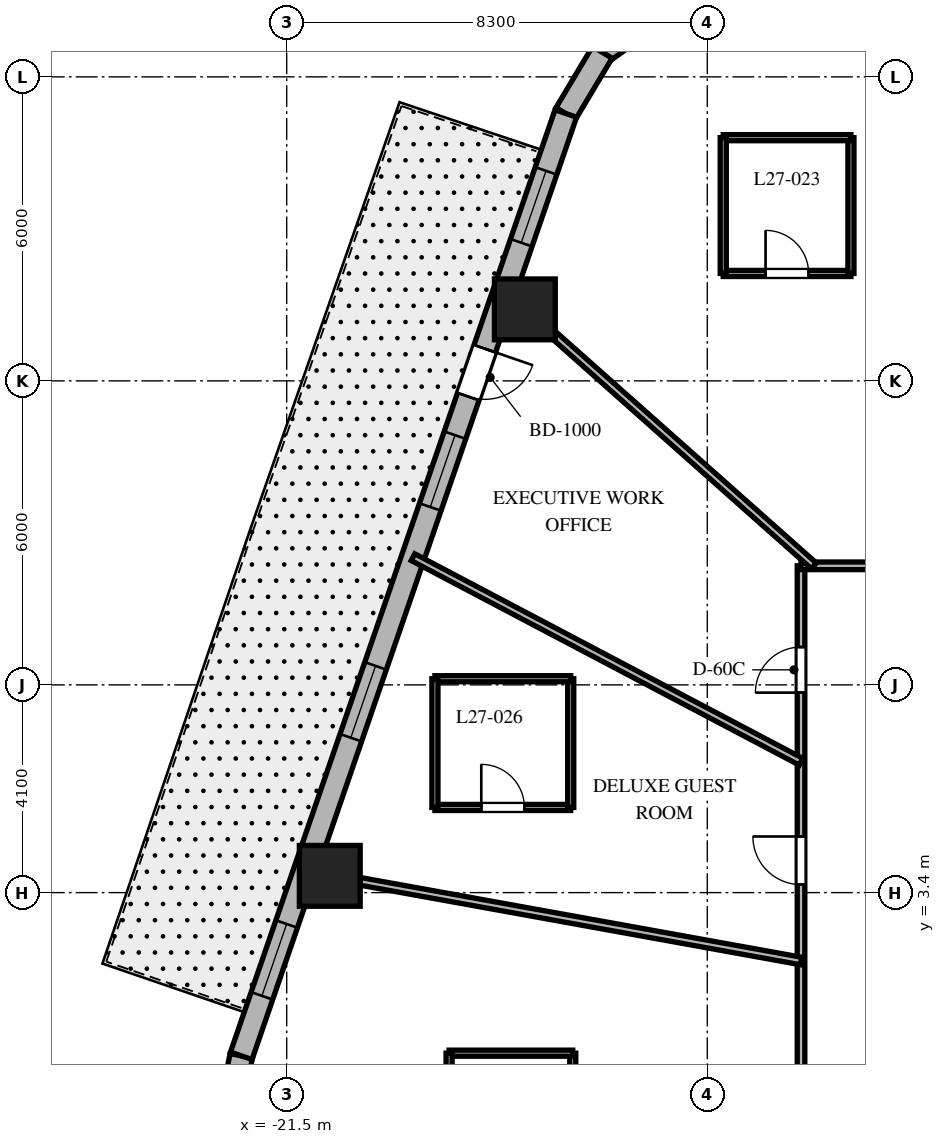
"""IFC4 building model, lengths in metres.
Left out: names, types, materials, properties, quantities, classifications, styles, units other than length and angle.
Written with IfcOpenShell. Run it as: python <this file> out.ifc"""

import sys

from ifc_helpers import new_model, si_unit, direction, frame, frame_2d, origin, origin_2d, place, context, subcontext, project, spatial, rectangle, extrude, element, fill, save


model = new_model("IFC4")
c1 = context("Model", 3, precision=1e-05, world=origin(), true_north=direction((0.0, 1.0)))
c2 = subcontext(c1, "Body", "Model", "MODEL_VIEW")
j1 = project(units=[si_unit("LENGTHUNIT", "METRE"), si_unit("PLANEANGLEUNIT", "RADIAN")], contexts=[c1])
p1 = place(None, origin())
s1 = spatial("IfcSite", under=j1, at=p1, CompositionType="ELEMENT")
p2 = place(p1, origin())
s2 = spatial("IfcBuilding", under=s1, at=p2, CompositionType="ELEMENT")
p3 = place(p2, frame((0.0, 0.0, 113.6)))
s3 = spatial("IfcBuildingStorey", under=s2, at=p3, CompositionType="ELEMENT", Elevation=113.6)
for number, where, z_axis, x_axis in (
    (1, (-16.8, 14.911, 0.0), (0.0, 0.0, 1.0), (1.0, 0.0, 0.0)),
    (2, (-20.65, 3.731, 0.0), (0.0, 0.0, 1.0), (1.0, 0.0, 0.0)),
):
    element("IfcColumn", number, at=place(p3, frame(where, z_axis=z_axis, x_axis=x_axis)), inside=s3, PredefinedType="COLUMN", context=c2, shape_type="SweptSolid", body=[
        extrude(rectangle(XDim=1.2, YDim=1.2, at=origin_2d()), origin(), (0.0, 0.0, 1.0), 3.7),
    ])
p4 = place(p3, frame((-14.146, 20.787, 0.0), z_axis=(0.0, 0.0, 1.0), x_axis=(-0.814162929117, -0.580636482536, 0.0)))
e3 = element("IfcWall", 3, at=p4, inside=s3, PredefinedType="SOLIDWALL", context=c2, shape_type="SweptSolid", body=[
    extrude(rectangle(XDim=1.382, YDim=0.45, at=frame_2d((0.691, 0.0))), origin(), (0.0, 0.0, 1.0), 3.4),
])
p5 = place(p3, frame((-15.272, 19.984, 0.0), z_axis=(0.0, 0.0, 1.0), x_axis=(-0.512579347361, -0.858639862025, 0.0)))
e4 = element("IfcWall", 4, at=p5, inside=s3, PredefinedType="SOLIDWALL", context=c2, shape_type="SweptSolid", body=[
    extrude(rectangle(XDim=1.406, YDim=0.45, at=frame_2d((0.703, 0.0))), origin(), (0.0, 0.0, 1.0), 3.4),
])
p6 = place(p3, frame((-22.397, 0.179, 0.0), z_axis=(0.0, 0.0, 1.0), x_axis=(-0.199313589404, -0.979935759669, 0.0)))
e5 = element("IfcWall", 5, at=p6, inside=s3, PredefinedType="SOLIDWALL", context=c2, shape_type="SweptSolid", body=[
    extrude(rectangle(XDim=0.896, YDim=0.45, at=frame_2d((0.448, 0.0))), origin(), (0.0, 0.0, 1.0), 3.4),
])
p7 = place(p3, frame((-15.992, 18.777, 0.0), z_axis=(0.0, 0.0, 1.0), x_axis=(-0.325606988926, -0.945505202927, 0.0)))
e6 = element("IfcWall", 6, at=p7, inside=s3, PredefinedType="SOLIDWALL", context=c2, shape_type="SweptSolid", body=[
    extrude(rectangle(XDim=19.669, YDim=0.45, at=frame_2d((9.835, 0.0))), origin(), (0.0, 0.0, 1.0), 3.4),
])
p8 = place(p7, frame((4.909, 0.0, 0.0)))
e7 = element("IfcOpeningElement", 7, at=p8, cuts=e6, PredefinedType="OPENING", context=c2, shape_type="SweptSolid", body=[
    extrude(rectangle(XDim=1.0, YDim=2.15, at=frame_2d((0.5, 1.075))), frame((0.0, 0.235, 0.0), z_axis=(0.0, -1.0, 0.0), x_axis=(1.0, 0.0, 0.0)), (0.0, 0.0, 1.0), 0.47),
])
p9 = place(p7, frame((1.197, 0.0, 0.8)))
e8 = element("IfcOpeningElement", 8, at=p9, cuts=e6, PredefinedType="OPENING", context=c2, shape_type="SweptSolid", body=[
    extrude(rectangle(XDim=1.5, YDim=1.8, at=frame_2d((0.75, 0.9))), frame((0.0, 0.235, 0.0), z_axis=(0.0, -1.0, 0.0), x_axis=(1.0, 0.0, 0.0)), (0.0, 0.0, 1.0), 0.47),
])
p10 = place(p7, frame((6.714, 0.0, 0.8)))
e9 = element("IfcOpeningElement", 9, at=p10, cuts=e6, PredefinedType="OPENING", context=c2, shape_type="SweptSolid", body=[
    extrude(rectangle(XDim=1.5, YDim=1.8, at=frame_2d((0.75, 0.9))), frame((0.0, 0.235, 0.0), z_axis=(0.0, -1.0, 0.0), x_axis=(1.0, 0.0, 0.0)), (0.0, 0.0, 1.0), 0.47),
])
p11 = place(p7, frame((11.53, 0.0, 0.8)))
e10 = element("IfcOpeningElement", 10, at=p11, cuts=e6, PredefinedType="OPENING", context=c2, shape_type="SweptSolid", body=[
    extrude(rectangle(XDim=1.5, YDim=1.8, at=frame_2d((0.75, 0.9))), frame((0.0, 0.235, 0.0), z_axis=(0.0, -1.0, 0.0), x_axis=(1.0, 0.0, 0.0)), (0.0, 0.0, 1.0), 0.47),
])
p12 = place(p7, frame((16.918, 0.0, 0.8)))
e11 = element("IfcOpeningElement", 11, at=p12, cuts=e6, PredefinedType="OPENING", context=c2, shape_type="SweptSolid", body=[
    extrude(rectangle(XDim=1.5, YDim=1.8, at=frame_2d((0.75, 0.9))), frame((0.0, 0.235, 0.0), z_axis=(0.0, -1.0, 0.0), x_axis=(1.0, 0.0, 0.0)), (0.0, 0.0, 1.0), 0.47),
])
p13 = place(p3, frame((-11.35, -9.85, 0.0), z_axis=(0.0, 0.0, 1.0), x_axis=(0.0, 1.0, 0.0)))
e12 = element("IfcWall", 12, at=p13, inside=s3, PredefinedType="PARTITIONING", context=c2, shape_type="SweptSolid", body=[
    extrude(rectangle(XDim=19.7, YDim=0.15, at=frame_2d((9.85, 0.0))), origin(), (0.0, 0.0, 1.0), 2.84),
])
p14 = place(p13, frame((17.197, 0.0, 0.0)))
e13 = element("IfcOpeningElement", 13, at=p14, cuts=e12, PredefinedType="OPENING", context=c2, shape_type="SweptSolid", body=[
    extrude(rectangle(XDim=0.9, YDim=2.03, at=frame_2d((0.45, 1.015))), frame((0.0, 0.085, 0.0), z_axis=(0.0, -1.0, 0.0), x_axis=(1.0, 0.0, 0.0)), (0.0, 0.0, 1.0), 0.17),
])
p15 = place(p13, frame((13.408, 0.0, 0.0)))
e14 = element("IfcOpeningElement", 14, at=p15, cuts=e12, PredefinedType="OPENING", context=c2, shape_type="SweptSolid", body=[
    extrude(rectangle(XDim=0.95, YDim=2.03, at=frame_2d((0.475, 1.015))), frame((0.0, 0.085, 0.0), z_axis=(0.0, -1.0, 0.0), x_axis=(1.0, 0.0, 0.0)), (0.0, 0.0, 1.0), 0.17),
])
p16 = place(p13, frame((8.836, 0.0, 0.0)))
e15 = element("IfcOpeningElement", 15, at=p16, cuts=e12, PredefinedType="OPENING", context=c2, shape_type="SweptSolid", body=[
    extrude(rectangle(XDim=0.95, YDim=2.03, at=frame_2d((0.475, 1.015))), frame((0.0, 0.085, 0.0), z_axis=(0.0, -1.0, 0.0), x_axis=(1.0, 0.0, 0.0)), (0.0, 0.0, 1.0), 0.17),
])
p17 = place(p13, frame((4.199, 0.0, 0.0)))
e16 = element("IfcOpeningElement", 16, at=p17, cuts=e12, PredefinedType="OPENING", context=c2, shape_type="SweptSolid", body=[
    extrude(rectangle(XDim=0.95, YDim=2.03, at=frame_2d((0.475, 1.015))), frame((0.0, 0.085, 0.0), z_axis=(0.0, -1.0, 0.0), x_axis=(1.0, 0.0, 0.0)), (0.0, 0.0, 1.0), 0.17),
])
p18 = place(p13, frame((1.002, 0.0, 0.0)))
e17 = element("IfcOpeningElement", 17, at=p18, cuts=e12, PredefinedType="OPENING", context=c2, shape_type="SweptSolid", body=[
    extrude(rectangle(XDim=0.9, YDim=2.03, at=frame_2d((0.45, 1.015))), frame((0.0, 0.085, 0.0), z_axis=(0.0, -1.0, 0.0), x_axis=(1.0, 0.0, 0.0)), (0.0, 0.0, 1.0), 0.17),
])
p19 = place(p3, frame((-11.35, 9.85, 0.0), z_axis=(0.0, 0.0, 1.0), x_axis=(1.0, 0.0, 0.0)))
e18 = element("IfcWall", 18, at=p19, inside=s3, PredefinedType="PARTITIONING", context=c2, shape_type="SweptSolid", body=[
    extrude(rectangle(XDim=22.7, YDim=0.15, at=frame_2d((11.35, 0.0))), origin(), (0.0, 0.0, 1.0), 2.84),
])
p20 = place(p19, frame((17.237, 0.0, 0.0)))
e19 = element("IfcOpeningElement", 19, at=p20, cuts=e18, PredefinedType="OPENING", context=c2, shape_type="SweptSolid", body=[
    extrude(rectangle(XDim=0.95, YDim=2.03, at=frame_2d((0.475, 1.015))), frame((0.0, 0.085, 0.0), z_axis=(0.0, -1.0, 0.0), x_axis=(1.0, 0.0, 0.0)), (0.0, 0.0, 1.0), 0.17),
])
p21 = place(p19, frame((12.192, 0.0, 0.0)))
e20 = element("IfcOpeningElement", 20, at=p21, cuts=e18, PredefinedType="OPENING", context=c2, shape_type="SweptSolid", body=[
    extrude(rectangle(XDim=0.95, YDim=2.03, at=frame_2d((0.475, 1.015))), frame((0.0, 0.085, 0.0), z_axis=(0.0, -1.0, 0.0), x_axis=(1.0, 0.0, 0.0)), (0.0, 0.0, 1.0), 0.17),
])
p22 = place(p19, frame((8.757, 0.0, 0.0)))
e21 = element("IfcOpeningElement", 21, at=p22, cuts=e18, PredefinedType="OPENING", context=c2, shape_type="SweptSolid", body=[
    extrude(rectangle(XDim=0.95, YDim=2.03, at=frame_2d((0.475, 1.015))), frame((0.0, 0.085, 0.0), z_axis=(0.0, -1.0, 0.0), x_axis=(1.0, 0.0, 0.0)), (0.0, 0.0, 1.0), 0.17),
])
p23 = place(p19, frame((3.399, 0.0, 0.0)))
e22 = element("IfcOpeningElement", 22, at=p23, cuts=e18, PredefinedType="OPENING", context=c2, shape_type="SweptSolid", body=[
    extrude(rectangle(XDim=0.95, YDim=2.03, at=frame_2d((0.475, 1.015))), frame((0.0, 0.085, 0.0), z_axis=(0.0, -1.0, 0.0), x_axis=(1.0, 0.0, 0.0)), (0.0, 0.0, 1.0), 0.17),
])
p24 = place(p3, frame((-11.098, 9.85, 0.0), z_axis=(0.0, 0.0, 1.0), x_axis=(-0.747904295103, 0.663806572253, 0.0)))
e23 = element("IfcWall", 23, at=p24, inside=s3, PredefinedType="PARTITIONING", context=c2, shape_type="SweptSolid", body=[
    extrude(rectangle(XDim=8.16, YDim=0.15, at=frame_2d((4.08, 0.0))), origin(), (0.0, 0.0, 1.0), 2.54),
])
p25 = place(p3, frame((-11.35, 5.983, 0.0), z_axis=(0.0, 0.0, 1.0), x_axis=(-0.884597447182, 0.466355397137, 0.0)))
e24 = element("IfcWall", 24, at=p25, inside=s3, PredefinedType="PARTITIONING", context=c2, shape_type="SweptSolid", body=[
    extrude(rectangle(XDim=8.657, YDim=0.15, at=frame_2d((4.328, 0.0))), origin(), (0.0, 0.0, 1.0), 2.54),
])
p26 = place(p3, frame((-11.35, 2.051, 0.0), z_axis=(0.0, 0.0, 1.0), x_axis=(-0.984068313063, 0.177790762484, 0.0)))
e25 = element("IfcWall", 25, at=p26, inside=s3, PredefinedType="PARTITIONING", context=c2, shape_type="SweptSolid", body=[
    extrude(rectangle(XDim=9.951, YDim=0.15, at=frame_2d((4.976, 0.0))), origin(), (0.0, 0.0, 1.0), 2.54),
])
p27 = place(p3, frame((-12.885, 15.62, 0.0), z_axis=(0.0, 0.0, 1.0), x_axis=(1.0, 0.0, 0.0)))
e26 = element("IfcWall", 26, at=p27, inside=s3, PredefinedType="PARTITIONING", context=c2, shape_type="SweptSolid", body=[
    extrude(rectangle(XDim=2.52, YDim=0.12, at=frame_2d((1.26, 0.0))), origin(), (0.0, 0.0, 1.0), 3.4),
])
p28 = place(p27, frame((0.835, 0.0, 0.0)))
e27 = element("IfcOpeningElement", 27, at=p28, cuts=e26, PredefinedType="OPENING", context=c2, shape_type="SweptSolid", body=[
    extrude(rectangle(XDim=0.85, YDim=2.03, at=frame_2d((0.425, 1.015))), frame((0.0, 0.07, 0.0), z_axis=(0.0, -1.0, 0.0), x_axis=(1.0, 0.0, 0.0)), (0.0, 0.0, 1.0), 0.14),
])
p29 = place(p3, frame((-10.365, 15.62, 0.0), z_axis=(0.0, 0.0, 1.0), x_axis=(0.0, 1.0, 0.0)))
e28 = element("IfcWall", 28, at=p29, inside=s3, PredefinedType="PARTITIONING", context=c2, shape_type="SweptSolid", body=[
    extrude(rectangle(XDim=2.68, YDim=0.12, at=frame_2d((1.34, 0.0))), origin(), (0.0, 0.0, 1.0), 3.4),
])
p30 = place(p3, frame((-10.365, 18.3, 0.0), z_axis=(0.0, 0.0, 1.0), x_axis=(-1.0, 0.0, 0.0)))
e29 = element("IfcWall", 29, at=p30, inside=s3, PredefinedType="PARTITIONING", context=c2, shape_type="SweptSolid", body=[
    extrude(rectangle(XDim=2.52, YDim=0.12, at=frame_2d((1.26, 0.0))), origin(), (0.0, 0.0, 1.0), 2.54),
])
p31 = place(p3, frame((-12.885, 18.3, 0.0), z_axis=(0.0, 0.0, 1.0), x_axis=(0.0, -1.0, 0.0)))
e30 = element("IfcWall", 30, at=p31, inside=s3, PredefinedType="PARTITIONING", context=c2, shape_type="SweptSolid", body=[
    extrude(rectangle(XDim=2.68, YDim=0.12, at=frame_2d((1.34, 0.0))), origin(), (0.0, 0.0, 1.0), 2.54),
])
p32 = place(p3, frame((-18.575, 5.081, 0.0), z_axis=(0.0, 0.0, 1.0), x_axis=(1.0, 0.0, 0.0)))
e31 = element("IfcWall", 31, at=p32, inside=s3, PredefinedType="PARTITIONING", context=c2, shape_type="SweptSolid", body=[
    extrude(rectangle(XDim=2.68, YDim=0.12, at=frame_2d((1.34, 0.0))), origin(), (0.0, 0.0, 1.0), 2.84),
])
p33 = place(p32, frame((0.915, 0.0, 0.0)))
e32 = element("IfcOpeningElement", 32, at=p33, cuts=e31, PredefinedType="OPENING", context=c2, shape_type="SweptSolid", body=[
    extrude(rectangle(XDim=0.85, YDim=2.03, at=frame_2d((0.425, 1.015))), frame((0.0, 0.07, 0.0), z_axis=(0.0, -1.0, 0.0), x_axis=(1.0, 0.0, 0.0)), (0.0, 0.0, 1.0), 0.14),
])
p34 = place(p3, frame((-15.895, 5.081, 0.0), z_axis=(0.0, 0.0, 1.0), x_axis=(0.0, 1.0, 0.0)))
e33 = element("IfcWall", 33, at=p34, inside=s3, PredefinedType="PARTITIONING", context=c2, shape_type="SweptSolid", body=[
    extrude(rectangle(XDim=2.54, YDim=0.12, at=frame_2d((1.27, 0.0))), origin(), (0.0, 0.0, 1.0), 2.84),
])
p35 = place(p3, frame((-15.895, 7.621, 0.0), z_axis=(0.0, 0.0, 1.0), x_axis=(-1.0, 0.0, 0.0)))
e34 = element("IfcWall", 34, at=p35, inside=s3, PredefinedType="PARTITIONING", context=c2, shape_type="SweptSolid", body=[
    extrude(rectangle(XDim=2.68, YDim=0.12, at=frame_2d((1.34, 0.0))), origin(), (0.0, 0.0, 1.0), 2.972),
])
p36 = place(p3, frame((-18.575, 7.621, 0.0), z_axis=(0.0, 0.0, 1.0), x_axis=(0.0, -1.0, 0.0)))
e35 = element("IfcWall", 35, at=p36, inside=s3, PredefinedType="PARTITIONING", context=c2, shape_type="SweptSolid", body=[
    extrude(rectangle(XDim=2.54, YDim=0.12, at=frame_2d((1.27, 0.0))), origin(), (0.0, 0.0, 1.0), 3.4),
])
p37 = place(p3, frame((-15.855, -2.379, 0.0), z_axis=(0.0, 0.0, 1.0), x_axis=(0.0, 1.0, 0.0)))
e36 = element("IfcWall", 36, at=p37, inside=s3, PredefinedType="PARTITIONING", context=c2, shape_type="SweptSolid", body=[
    extrude(rectangle(XDim=2.61, YDim=0.12, at=frame_2d((1.305, 0.0))), origin(), (0.0, 0.0, 1.0), 3.4),
])
p38 = place(p3, frame((-15.855, 0.231, 0.0), z_axis=(0.0, 0.0, 1.0), x_axis=(-1.0, 0.0, 0.0)))
e37 = element("IfcWall", 37, at=p38, inside=s3, PredefinedType="PARTITIONING", context=c2, shape_type="SweptSolid", body=[
    extrude(rectangle(XDim=2.44, YDim=0.12, at=frame_2d((1.22, 0.0))), origin(), (0.0, 0.0, 1.0), 2.84),
])
p39 = place(p3, frame((-18.295, 0.231, 0.0), z_axis=(0.0, 0.0, 1.0), x_axis=(0.0, -1.0, 0.0)))
e38 = element("IfcWall", 38, at=p39, inside=s3, PredefinedType="PARTITIONING", context=c2, shape_type="SweptSolid", body=[
    extrude(rectangle(XDim=2.61, YDim=0.12, at=frame_2d((1.305, 0.0))), origin(), (0.0, 0.0, 1.0), 3.4),
])
p40 = place(p8, origin())
e39 = element("IfcDoor", 39, at=p40, inside=s3, OperationType="SINGLE_SWING_LEFT", PredefinedType="DOOR", context=c2, shape_type="SweptSolid", body=[
    extrude(rectangle(XDim=1.0, YDim=2.15, at=frame_2d((0.5, 1.075))), frame((0.0, 0.025, 0.0), z_axis=(0.0, -1.0, 0.0), x_axis=(1.0, 0.0, 0.0)), (0.0, 0.0, 1.0), 0.05),
])
fill(e7, e39)
p41 = place(p9, origin())
e40 = element("IfcWindow", 40, at=p41, inside=s3, PartitioningType="SINGLE_PANEL", PredefinedType="WINDOW", context=c2, shape_type="SweptSolid", body=[
    extrude(rectangle(XDim=1.5, YDim=1.8, at=frame_2d((0.75, 0.9))), frame((0.0, 0.03, 0.0), z_axis=(0.0, -1.0, 0.0), x_axis=(1.0, 0.0, 0.0)), (0.0, 0.0, 1.0), 0.06),
])
fill(e8, e40)
p42 = place(p10, origin())
e41 = element("IfcWindow", 41, at=p42, inside=s3, PartitioningType="SINGLE_PANEL", PredefinedType="WINDOW", context=c2, shape_type="SweptSolid", body=[
    extrude(rectangle(XDim=1.5, YDim=1.8, at=frame_2d((0.75, 0.9))), frame((0.0, 0.03, 0.0), z_axis=(0.0, -1.0, 0.0), x_axis=(1.0, 0.0, 0.0)), (0.0, 0.0, 1.0), 0.06),
])
fill(e9, e41)
p43 = place(p11, origin())
e42 = element("IfcWindow", 42, at=p43, inside=s3, PartitioningType="SINGLE_PANEL", PredefinedType="WINDOW", context=c2, shape_type="SweptSolid", body=[
    extrude(rectangle(XDim=1.5, YDim=1.8, at=frame_2d((0.75, 0.9))), frame((0.0, 0.03, 0.0), z_axis=(0.0, -1.0, 0.0), x_axis=(1.0, 0.0, 0.0)), (0.0, 0.0, 1.0), 0.06),
])
fill(e10, e42)
p44 = place(p12, origin())
e43 = element("IfcWindow", 43, at=p44, inside=s3, PartitioningType="SINGLE_PANEL", PredefinedType="WINDOW", context=c2, shape_type="SweptSolid", body=[
    extrude(rectangle(XDim=1.5, YDim=1.8, at=frame_2d((0.75, 0.9))), frame((0.0, 0.03, 0.0), z_axis=(0.0, -1.0, 0.0), x_axis=(1.0, 0.0, 0.0)), (0.0, 0.0, 1.0), 0.06),
])
fill(e11, e43)
p45 = place(p28, origin())
e44 = element("IfcDoor", 44, at=p45, inside=s3, OperationType="SINGLE_SWING_LEFT", PredefinedType="DOOR", context=c2, shape_type="SweptSolid", body=[
    extrude(rectangle(XDim=0.85, YDim=2.03, at=frame_2d((0.425, 1.015))), frame((0.0, 0.025, 0.0), z_axis=(0.0, -1.0, 0.0), x_axis=(1.0, 0.0, 0.0)), (0.0, 0.0, 1.0), 0.05),
])
fill(e27, e44)
p46 = place(p14, origin())
e45 = element("IfcDoor", 45, at=p46, inside=s3, OperationType="SINGLE_SWING_LEFT", PredefinedType="DOOR", context=c2, shape_type="SweptSolid", body=[
    extrude(rectangle(XDim=0.9, YDim=2.03, at=frame_2d((0.45, 1.015))), frame((0.0, 0.025, 0.0), z_axis=(0.0, -1.0, 0.0), x_axis=(1.0, 0.0, 0.0)), (0.0, 0.0, 1.0), 0.05),
])
fill(e13, e45)
p47 = place(p15, origin())
e46 = element("IfcDoor", 46, at=p47, inside=s3, OperationType="SINGLE_SWING_RIGHT", PredefinedType="DOOR", context=c2, shape_type="SweptSolid", body=[
    extrude(rectangle(XDim=0.95, YDim=2.03, at=frame_2d((0.475, 1.015))), frame((0.0, 0.025, 0.0), z_axis=(0.0, -1.0, 0.0), x_axis=(1.0, 0.0, 0.0)), (0.0, 0.0, 1.0), 0.05),
])
fill(e14, e46)
p48 = place(p33, origin())
e47 = element("IfcDoor", 47, at=p48, inside=s3, OperationType="SINGLE_SWING_LEFT", PredefinedType="DOOR", context=c2, shape_type="SweptSolid", body=[
    extrude(rectangle(XDim=0.85, YDim=2.03, at=frame_2d((0.425, 1.015))), frame((0.0, 0.025, 0.0), z_axis=(0.0, -1.0, 0.0), x_axis=(1.0, 0.0, 0.0)), (0.0, 0.0, 1.0), 0.05),
])
fill(e32, e47)
save(model, sys.argv[1])
